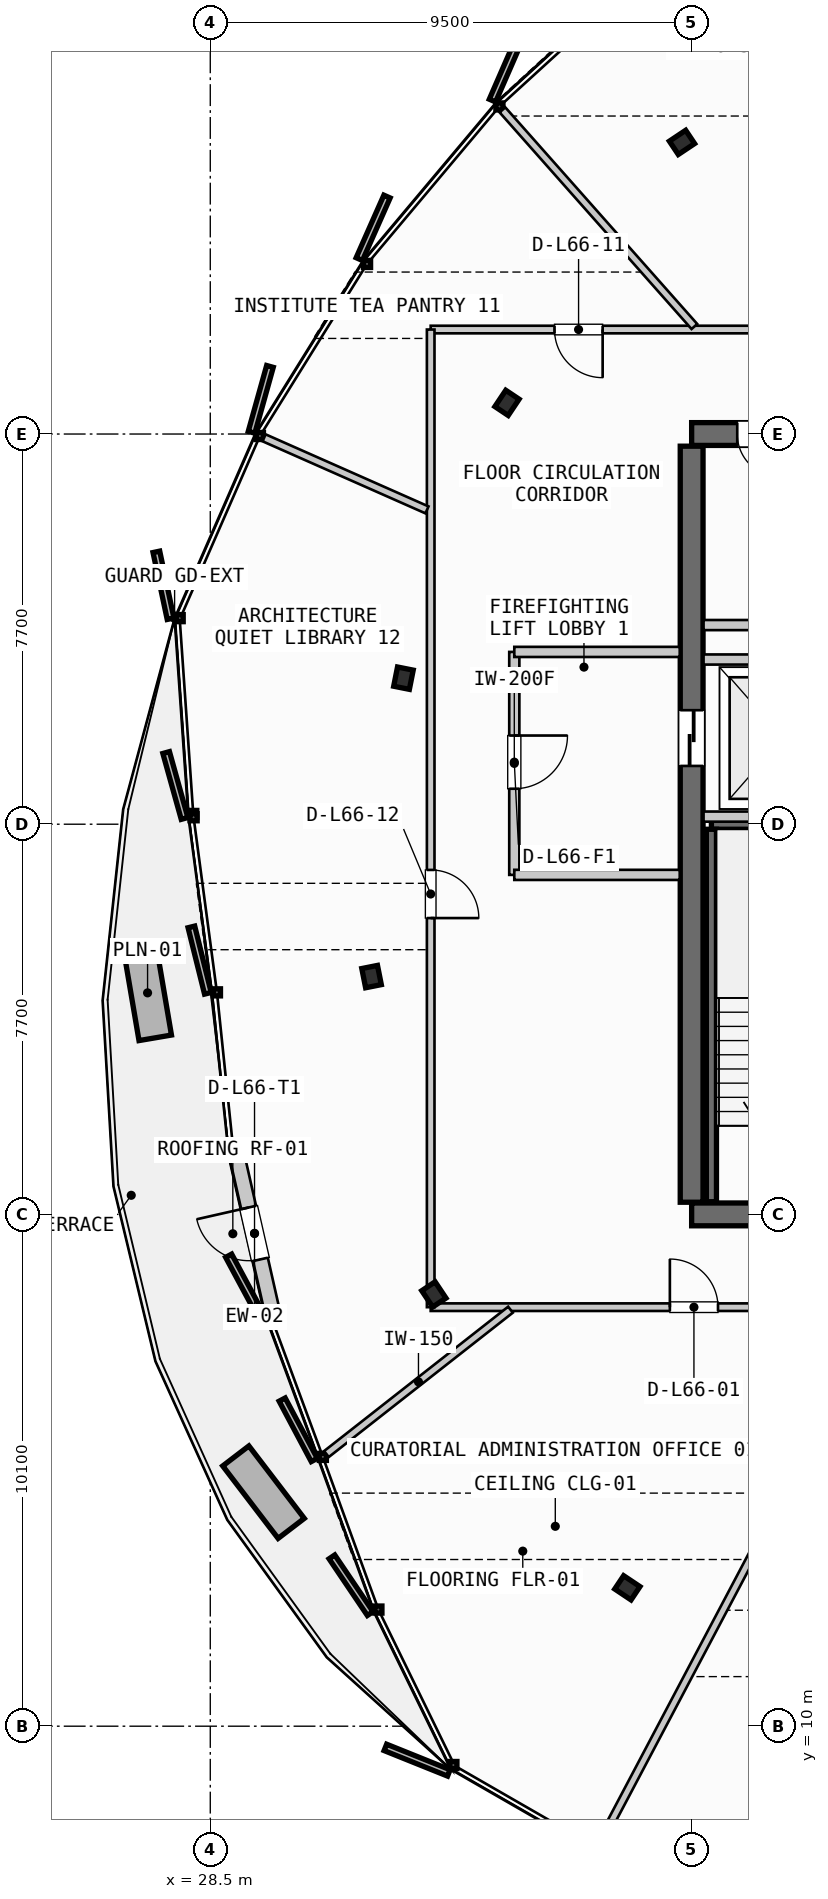
"""IFC4 building model, lengths in metres.
Left out: names, types, materials, properties, quantities, classifications, styles, units other than length and angle.
Written with IfcOpenShell. Run it as: python <this file> out.ifc"""

import sys

from ifc_helpers import new_model, si_unit, direction, frame, frame_2d, origin, origin_2d, place, context, subcontext, project, spatial, rectangle, i_section, extrude, source, transform, mapped, element, fill, save


model = new_model("IFC4")
c1 = context("Model", 3, precision=1e-05, world=origin(), true_north=direction((0.0, 1.0)))
c2 = subcontext(c1, "Body", "Model", "MODEL_VIEW")
j1 = project(units=[si_unit("LENGTHUNIT", "METRE"), si_unit("PLANEANGLEUNIT", "RADIAN")], contexts=[c1])
p1 = place(None, origin())
s1 = spatial("IfcSite", under=j1, at=p1, CompositionType="ELEMENT")
p2 = place(p1, origin())
s2 = spatial("IfcBuilding", under=s1, at=p2, CompositionType="ELEMENT")
p3 = place(p2, frame((0.0, 0.0, 252.55)))
s3 = spatial("IfcBuildingStorey", under=s2, at=p3, CompositionType="ELEMENT", Elevation=252.55)
p4 = place(p3, frame((38.0, 20.1, 0.0), z_axis=(0.0, 0.0, 1.0), x_axis=(1.0, 0.0, 0.0)))
e1 = element("IfcWall", 1, at=p4, inside=s3, PredefinedType="SHEAR", context=c2, shape_type="SweptSolid", body=[
    extrude(rectangle(XDim=17.6, YDim=0.45, at=frame_2d((8.8, 0.0))), origin(), (0.0, 0.0, 1.0), 3.21),
])
p5 = place(p4, frame((1.4, 0.0, 0.0)))
e2 = element("IfcOpeningElement", 2, at=p5, cuts=e1, PredefinedType="OPENING", context=c2, shape_type="SweptSolid", body=[
    extrude(rectangle(XDim=1.05, YDim=2.15, at=frame_2d((0.525, 1.075))), frame((0.0, 0.235, 0.0), z_axis=(0.0, -1.0, 0.0), x_axis=(1.0, 0.0, 0.0)), (0.0, 0.0, 1.0), 0.47),
])
p6 = place(p4, frame((15.15, 0.0, 0.0)))
e3 = element("IfcOpeningElement", 3, at=p6, cuts=e1, PredefinedType="OPENING", context=c2, shape_type="SweptSolid", body=[
    extrude(rectangle(XDim=1.05, YDim=2.15, at=frame_2d((0.525, 1.075))), frame((0.0, 0.235, 0.0), z_axis=(0.0, -1.0, 0.0), x_axis=(1.0, 0.0, 0.0)), (0.0, 0.0, 1.0), 0.47),
])
p7 = place(p4, frame((5.25, 0.0, 0.0)))
e4 = element("IfcOpeningElement", 4, at=p7, cuts=e1, PredefinedType="OPENING", context=c2, shape_type="SweptSolid", body=[
    extrude(rectangle(XDim=0.95, YDim=2.15, at=frame_2d((0.475, 1.075))), frame((0.0, 0.235, 0.0), z_axis=(0.0, -1.0, 0.0), x_axis=(1.0, 0.0, 0.0)), (0.0, 0.0, 1.0), 0.47),
])
p8 = place(p4, frame((11.4, 0.0, 0.0)))
e5 = element("IfcOpeningElement", 5, at=p8, cuts=e1, PredefinedType="OPENING", context=c2, shape_type="SweptSolid", body=[
    extrude(rectangle(XDim=0.95, YDim=2.15, at=frame_2d((0.475, 1.075))), frame((0.0, 0.235, 0.0), z_axis=(0.0, -1.0, 0.0), x_axis=(1.0, 0.0, 0.0)), (0.0, 0.0, 1.0), 0.47),
])
p9 = place(p3, frame((55.6, 35.5, 0.0), z_axis=(0.0, 0.0, 1.0), x_axis=(-1.0, 0.0, 0.0)))
e6 = element("IfcWall", 6, at=p9, inside=s3, PredefinedType="SHEAR", context=c2, shape_type="SweptSolid", body=[
    extrude(rectangle(XDim=17.6, YDim=0.45, at=frame_2d((8.8, 0.0))), origin(), (0.0, 0.0, 1.0), 3.21),
])
p10 = place(p9, frame((8.05, 0.0, 0.0)))
e7 = element("IfcOpeningElement", 7, at=p10, cuts=e6, PredefinedType="OPENING", context=c2, shape_type="SweptSolid", body=[
    extrude(rectangle(XDim=1.5, YDim=2.2, at=frame_2d((0.75, 1.1))), frame((0.0, 0.235, 0.0), z_axis=(0.0, -1.0, 0.0), x_axis=(1.0, 0.0, 0.0)), (0.0, 0.0, 1.0), 0.47),
])
p11 = place(p9, frame((15.85, 0.0, 0.0)))
e8 = element("IfcOpeningElement", 8, at=p11, cuts=e6, PredefinedType="OPENING", context=c2, shape_type="SweptSolid", body=[
    extrude(rectangle(XDim=0.85, YDim=2.15, at=frame_2d((0.425, 1.075))), frame((0.0, 0.235, 0.0), z_axis=(0.0, -1.0, 0.0), x_axis=(1.0, 0.0, 0.0)), (0.0, 0.0, 1.0), 0.47),
])
p12 = place(p9, frame((14.35, 0.0, 0.0)))
e9 = element("IfcOpeningElement", 9, at=p12, cuts=e6, PredefinedType="OPENING", context=c2, shape_type="SweptSolid", body=[
    extrude(rectangle(XDim=0.85, YDim=2.15, at=frame_2d((0.425, 1.075))), frame((0.0, 0.235, 0.0), z_axis=(0.0, -1.0, 0.0), x_axis=(1.0, 0.0, 0.0)), (0.0, 0.0, 1.0), 0.47),
])
p13 = place(p9, frame((12.3, 0.0, 0.0)))
e10 = element("IfcOpeningElement", 10, at=p13, cuts=e6, PredefinedType="OPENING", context=c2, shape_type="SweptSolid", body=[
    extrude(rectangle(XDim=0.95, YDim=2.15, at=frame_2d((0.475, 1.075))), frame((0.0, 0.235, 0.0), z_axis=(0.0, -1.0, 0.0), x_axis=(1.0, 0.0, 0.0)), (0.0, 0.0, 1.0), 0.47),
])
p14 = place(p9, frame((10.2, 0.0, 0.0)))
e11 = element("IfcOpeningElement", 11, at=p14, cuts=e6, PredefinedType="OPENING", context=c2, shape_type="SweptSolid", body=[
    extrude(rectangle(XDim=0.9, YDim=2.15, at=frame_2d((0.45, 1.075))), frame((0.0, 0.235, 0.0), z_axis=(0.0, -1.0, 0.0), x_axis=(1.0, 0.0, 0.0)), (0.0, 0.0, 1.0), 0.47),
])
p15 = place(p3, frame((38.0, 35.26, 0.0), z_axis=(0.0, 0.0, 1.0), x_axis=(0.0, -1.0, 0.0)))
e12 = element("IfcWall", 12, at=p15, inside=s3, PredefinedType="SHEAR", context=c2, shape_type="SweptSolid", body=[
    extrude(rectangle(XDim=14.92, YDim=0.45, at=frame_2d((7.46, 0.0))), origin(), (0.0, 0.0, 1.0), 3.21),
])
p16 = place(p15, frame((5.21, 0.0, 0.0)))
e13 = element("IfcOpeningElement", 13, at=p16, cuts=e12, PredefinedType="OPENING", context=c2, shape_type="SweptSolid", body=[
    extrude(rectangle(XDim=1.1, YDim=2.2, at=frame_2d((0.55, 1.1))), frame((0.0, 0.235, 0.0), z_axis=(0.0, -1.0, 0.0), x_axis=(1.0, 0.0, 0.0)), (0.0, 0.0, 1.0), 0.47),
])
m1 = source(origin(), c2, "Body", "SweptSolid", [
    extrude(i_section(OverallWidth=0.387, OverallDepth=0.316, WebThickness=0.019, FlangeThickness=0.028, FilletRadius=0.015, at=origin_2d()), origin(), (0.0, 0.0, 1.0), 3.21),
])
for number, where, z_axis, x_axis in (
    (14, (37.81, 41.255, 0.0), (0.0, 0.0, 1.0), (-0.556, 0.831, 0.0)),
    (15, (34.356, 36.115, 0.0), (0.0, 0.0, 1.0), (-0.831, 0.556, 0.0)),
    (16, (32.312, 30.682, 0.0), (0.0, 0.0, 1.0), (-0.981, 0.195, 0.0)),
    (17, (31.683, 24.793, 0.0), (0.0, 0.0, 1.0), (-0.981, -0.195, 0.0)),
    (18, (32.913, 18.521, 0.0), (0.0, 0.0, 1.0), (-0.831, -0.556, 0.0)),
    (19, (36.731, 12.731, 0.0), (0.0, 0.0, 1.0), (-0.556, -0.831, 0.0)),
):
    element("IfcColumn", number, at=place(p3, frame(where, z_axis=z_axis, x_axis=x_axis)), inside=s3, PredefinedType="COLUMN", context=c2, shape_type="MappedRepresentation", body=[
        mapped(m1, transform((0.0, 0.0, 0.0), scale=1.0)),
    ])
p17 = place(p3, frame((29.721, 18.192, 0.0), z_axis=(0.0, 0.0, 1.0), x_axis=(-0.221248249318, 0.97521752044, 0.0)))
e20 = element("IfcWall", 20, at=p17, inside=s3, PredefinedType="SOLIDWALL", context=c2, shape_type="SweptSolid", body=[
    extrude(rectangle(XDim=3.142, YDim=0.3, at=frame_2d((1.571, 0.0))), origin(), (0.0, 0.0, 1.0), 2.735),
])
p18 = place(p17, frame((1.046, 0.0, 0.0)))
e21 = element("IfcOpeningElement", 21, at=p18, cuts=e20, PredefinedType="OPENING", context=c2, shape_type="SweptSolid", body=[
    extrude(rectangle(XDim=1.05, YDim=2.2, at=frame_2d((0.525, 1.1))), frame((0.0, 0.16, 0.0), z_axis=(0.0, -1.0, 0.0), x_axis=(1.0, 0.0, 0.0)), (0.0, 0.0, 1.0), 0.32),
])
p19 = place(p3, frame((38.39, 27.8, 0.0), z_axis=(0.0, 0.0, 1.0), x_axis=(1.0, 0.0, 0.0)))
e22 = element("IfcWall", 22, at=p19, inside=s3, PredefinedType="SHEAR", context=c2, shape_type="SweptSolid", body=[
    extrude(rectangle(XDim=3.06, YDim=0.2, at=frame_2d((1.53, 0.0))), origin(), (0.0, 0.0, 1.0), 3.21),
])
p20 = place(p3, frame((38.39, 20.35, 0.0), z_axis=(0.0, 0.0, 1.0), x_axis=(0.0, 1.0, 0.0)))
e23 = element("IfcWall", 23, at=p20, inside=s3, PredefinedType="SHEAR", context=c2, shape_type="SweptSolid", body=[
    extrude(rectangle(XDim=7.35, YDim=0.2, at=frame_2d((3.675, 0.0))), origin(), (0.0, 0.0, 1.0), 3.21),
])
for number, where, z_axis, x_axis in (
    (24, (38.235, 27.95, 0.0), (0.0, 0.0, 1.0), (1.0, 0.0, 0.0)),
    (25, (38.235, 31.05, 0.0), (0.0, 0.0, 1.0), (1.0, 0.0, 0.0)),
):
    element("IfcWall", number, at=place(p3, frame(where, z_axis=z_axis, x_axis=x_axis)), inside=s3, PredefinedType="PARTITIONING", context=c2, shape_type="SweptSolid", body=[
        extrude(rectangle(XDim=2.915, YDim=0.2, at=frame_2d((1.458, 0.0))), origin(), (0.0, 0.0, 1.0), 2.28),
    ])
p21 = place(p3, frame((34.5, 31.2, 0.0), z_axis=(0.0, 0.0, 1.0), x_axis=(0.0, -1.0, 0.0)))
e26 = element("IfcWall", 26, at=p21, inside=s3, PredefinedType="PARTITIONING", context=c2, shape_type="SweptSolid", body=[
    extrude(rectangle(XDim=4.4, YDim=0.2, at=frame_2d((2.2, 0.0))), origin(), (0.0, 0.0, 1.0), 2.28),
])
p22 = place(p21, frame((1.65, 0.0, 0.0)))
e27 = element("IfcOpeningElement", 27, at=p22, cuts=e26, PredefinedType="OPENING", context=c2, shape_type="SweptSolid", body=[
    extrude(rectangle(XDim=1.05, YDim=2.15, at=frame_2d((0.525, 1.075))), frame((0.0, 0.11, 0.0), z_axis=(0.0, -1.0, 0.0), x_axis=(1.0, 0.0, 0.0)), (0.0, 0.0, 1.0), 0.22),
])
for number, where, z_axis, x_axis in (
    (28, (34.5, 26.8, 0.0), (0.0, 0.0, 1.0), (1.0, 0.0, 0.0)),
    (29, (34.5, 31.2, 0.0), (0.0, 0.0, 1.0), (1.0, 0.0, 0.0)),
):
    element("IfcWall", number, at=place(p3, frame(where, z_axis=z_axis, x_axis=x_axis)), inside=s3, PredefinedType="PARTITIONING", context=c2, shape_type="SweptSolid", body=[
        extrude(rectangle(XDim=3.265, YDim=0.2, at=frame_2d((1.632, 0.0))), origin(), (0.0, 0.0, 1.0), 2.28),
    ])
p23 = place(p3, frame((38.235, 31.73, 0.0), z_axis=(0.0, 0.0, 1.0), x_axis=(1.0, 0.0, 0.0)))
e30 = element("IfcWall", 30, at=p23, inside=s3, PredefinedType="PARTITIONING", context=c2, shape_type="SweptSolid", body=[
    extrude(rectangle(XDim=7.565, YDim=0.2, at=frame_2d((3.782, 0.0))), origin(), (0.0, 0.0, 1.0), 2.28),
])
p24 = place(p3, frame((32.85, 18.269, 0.0), z_axis=(0.0, 0.0, 1.0), x_axis=(1.0, 0.0, 0.0)))
e31 = element("IfcWall", 31, at=p24, inside=s3, PredefinedType="PARTITIONING", context=c2, shape_type="SweptSolid", body=[
    extrude(rectangle(XDim=28.038, YDim=0.15, at=frame_2d((14.019, 0.0))), origin(), (0.0, 0.0, 1.0), 2.28),
])
p25 = place(p24, frame((4.72, 0.0, 0.0)))
e32 = element("IfcOpeningElement", 32, at=p25, cuts=e31, PredefinedType="OPENING", context=c2, shape_type="SweptSolid", body=[
    extrude(rectangle(XDim=0.95, YDim=2.15, at=frame_2d((0.475, 1.075))), frame((0.0, 0.085, 0.0), z_axis=(0.0, -1.0, 0.0), x_axis=(1.0, 0.0, 0.0)), (0.0, 0.0, 1.0), 0.17),
])
p26 = place(p24, frame((10.824, 0.0, 0.0)))
e33 = element("IfcOpeningElement", 33, at=p26, cuts=e31, PredefinedType="OPENING", context=c2, shape_type="SweptSolid", body=[
    extrude(rectangle(XDim=0.95, YDim=2.15, at=frame_2d((0.475, 1.075))), frame((0.0, 0.085, 0.0), z_axis=(0.0, -1.0, 0.0), x_axis=(1.0, 0.0, 0.0)), (0.0, 0.0, 1.0), 0.17),
])
p27 = place(p24, frame((16.132, 0.0, 0.0)))
e34 = element("IfcOpeningElement", 34, at=p27, cuts=e31, PredefinedType="OPENING", context=c2, shape_type="SweptSolid", body=[
    extrude(rectangle(XDim=0.95, YDim=2.15, at=frame_2d((0.475, 1.075))), frame((0.0, 0.085, 0.0), z_axis=(0.0, -1.0, 0.0), x_axis=(1.0, 0.0, 0.0)), (0.0, 0.0, 1.0), 0.17),
])
p28 = place(p24, frame((22.987, 0.0, 0.0)))
e35 = element("IfcOpeningElement", 35, at=p28, cuts=e31, PredefinedType="OPENING", context=c2, shape_type="SweptSolid", body=[
    extrude(rectangle(XDim=0.95, YDim=2.15, at=frame_2d((0.475, 1.075))), frame((0.0, 0.085, 0.0), z_axis=(0.0, -1.0, 0.0), x_axis=(1.0, 0.0, 0.0)), (0.0, 0.0, 1.0), 0.17),
])
p29 = place(p3, frame((60.888, 37.562, 0.0), z_axis=(0.0, 0.0, 1.0), x_axis=(-1.0, 0.0, 0.0)))
e36 = element("IfcWall", 36, at=p29, inside=s3, PredefinedType="PARTITIONING", context=c2, shape_type="SweptSolid", body=[
    extrude(rectangle(XDim=28.038, YDim=0.15, at=frame_2d((14.019, 0.0))), origin(), (0.0, 0.0, 1.0), 2.28),
])
p30 = place(p29, frame((5.737, 0.0, 0.0)))
e37 = element("IfcOpeningElement", 37, at=p30, cuts=e36, PredefinedType="OPENING", context=c2, shape_type="SweptSolid", body=[
    extrude(rectangle(XDim=0.95, YDim=2.15, at=frame_2d((0.475, 1.075))), frame((0.0, 0.085, 0.0), z_axis=(0.0, -1.0, 0.0), x_axis=(1.0, 0.0, 0.0)), (0.0, 0.0, 1.0), 0.17),
])
p31 = place(p29, frame((12.102, 0.0, 0.0)))
e38 = element("IfcOpeningElement", 38, at=p31, cuts=e36, PredefinedType="OPENING", context=c2, shape_type="SweptSolid", body=[
    extrude(rectangle(XDim=0.95, YDim=2.15, at=frame_2d((0.475, 1.075))), frame((0.0, 0.085, 0.0), z_axis=(0.0, -1.0, 0.0), x_axis=(1.0, 0.0, 0.0)), (0.0, 0.0, 1.0), 0.17),
])
p32 = place(p29, frame((18.47, 0.0, 0.0)))
e39 = element("IfcOpeningElement", 39, at=p32, cuts=e36, PredefinedType="OPENING", context=c2, shape_type="SweptSolid", body=[
    extrude(rectangle(XDim=0.95, YDim=2.15, at=frame_2d((0.475, 1.075))), frame((0.0, 0.085, 0.0), z_axis=(0.0, -1.0, 0.0), x_axis=(1.0, 0.0, 0.0)), (0.0, 0.0, 1.0), 0.17),
])
p33 = place(p29, frame((24.644, 0.0, 0.0)))
e40 = element("IfcOpeningElement", 40, at=p33, cuts=e36, PredefinedType="OPENING", context=c2, shape_type="SweptSolid", body=[
    extrude(rectangle(XDim=0.95, YDim=2.15, at=frame_2d((0.475, 1.075))), frame((0.0, 0.085, 0.0), z_axis=(0.0, -1.0, 0.0), x_axis=(1.0, 0.0, 0.0)), (0.0, 0.0, 1.0), 0.17),
])
p34 = place(p3, frame((32.85, 37.562, 0.0), z_axis=(0.0, 0.0, 1.0), x_axis=(0.0, -1.0, 0.0)))
e41 = element("IfcWall", 41, at=p34, inside=s3, PredefinedType="PARTITIONING", context=c2, shape_type="SweptSolid", body=[
    extrude(rectangle(XDim=19.293, YDim=0.15, at=frame_2d((9.646, 0.0))), origin(), (0.0, 0.0, 1.0), 2.28),
])
p35 = place(p34, frame((10.664, 0.0, 0.0)))
e42 = element("IfcOpeningElement", 42, at=p35, cuts=e41, PredefinedType="OPENING", context=c2, shape_type="SweptSolid", body=[
    extrude(rectangle(XDim=0.95, YDim=2.15, at=frame_2d((0.475, 1.075))), frame((0.0, 0.085, 0.0), z_axis=(0.0, -1.0, 0.0), x_axis=(1.0, 0.0, 0.0)), (0.0, 0.0, 1.0), 0.17),
])
p36 = place(p3, frame((34.425, 18.219, 0.0), z_axis=(0.0, 0.0, 1.0), x_axis=(-0.786874062285, -0.61711361199, 0.0)))
e43 = element("IfcWall", 43, at=p36, inside=s3, PredefinedType="PARTITIONING", context=c2, shape_type="SweptSolid", body=[
    extrude(rectangle(XDim=4.616, YDim=0.15, at=frame_2d((2.308, 0.0))), origin(), (0.0, 0.0, 1.0), 2.28),
])
p37 = place(p3, frame((41.743, 18.198, 0.0), z_axis=(0.0, 0.0, 1.0), x_axis=(-0.467260826369, -0.884119516887, 0.0)))
e44 = element("IfcWall", 44, at=p37, inside=s3, PredefinedType="PARTITIONING", context=c2, shape_type="SweptSolid", body=[
    extrude(rectangle(XDim=11.901, YDim=0.15, at=frame_2d((5.951, 0.0))), origin(), (0.0, 0.0, 1.0), 2.28),
])
p38 = place(p3, frame((38.054, 37.622, 0.0), z_axis=(0.0, 0.0, 1.0), x_axis=(-0.663185102797, 0.748455422472, 0.0)))
e45 = element("IfcWall", 45, at=p38, inside=s3, PredefinedType="PARTITIONING", context=c2, shape_type="SweptSolid", body=[
    extrude(rectangle(XDim=5.712, YDim=0.15, at=frame_2d((2.856, 0.0))), origin(), (0.0, 0.0, 1.0), 2.28),
])
p39 = place(p3, frame((32.777, 34.003, 0.0), z_axis=(0.0, 0.0, 1.0), x_axis=(-0.914477528369, 0.404636689028, 0.0)))
e46 = element("IfcWall", 46, at=p39, inside=s3, PredefinedType="PARTITIONING", context=c2, shape_type="SweptSolid", body=[
    extrude(rectangle(XDim=3.516, YDim=0.15, at=frame_2d((1.758, 0.0))), origin(), (0.0, 0.0, 1.0), 2.28),
])
m2 = source(origin(), c2, "Body", "SweptSolid", [
    extrude(rectangle(XDim=1.05, YDim=2.2, at=frame_2d((0.525, 1.1))), frame((0.0, 0.025, 0.0), z_axis=(0.0, -1.0, 0.0), x_axis=(1.0, 0.0, 0.0)), (0.0, 0.0, 1.0), 0.05),
])
p40 = place(p18, origin())
e47 = element("IfcDoor", 47, at=p40, inside=s3, OperationType="SINGLE_SWING_RIGHT", PredefinedType="DOOR", context=c2, shape_type="MappedRepresentation", body=[
    mapped(m2, transform((0.0, 0.0, 0.0), scale=1.0)),
])
fill(e21, e47)
m3 = source(origin(), c2, "Body", "SweptSolid", [
    extrude(rectangle(XDim=1.1, YDim=2.2, at=frame_2d((0.55, 1.1))), frame((0.0, 0.025, 0.0), z_axis=(0.0, -1.0, 0.0), x_axis=(1.0, 0.0, 0.0)), (0.0, 0.0, 1.0), 0.05),
])
p41 = place(p16, origin())
e48 = element("IfcDoor", 48, at=p41, inside=s3, OperationType="SLIDING_TO_LEFT", PredefinedType="DOOR", context=c2, shape_type="MappedRepresentation", body=[
    mapped(m3, transform((0.0, 0.0, 0.0), scale=1.0)),
])
fill(e13, e48)
m4 = source(origin(), c2, "Body", "SweptSolid", [
    extrude(rectangle(XDim=0.85, YDim=2.15, at=frame_2d((0.425, 1.075))), frame((0.0, 0.025, 0.0), z_axis=(0.0, -1.0, 0.0), x_axis=(1.0, 0.0, 0.0)), (0.0, 0.0, 1.0), 0.05),
])
p42 = place(p11, origin())
e49 = element("IfcDoor", 49, at=p42, inside=s3, OperationType="SINGLE_SWING_LEFT", PredefinedType="DOOR", context=c2, shape_type="MappedRepresentation", body=[
    mapped(m4, transform((0.0, 0.0, 0.0), scale=1.0)),
])
fill(e8, e49)
m5 = source(origin(), c2, "Body", "SweptSolid", [
    extrude(rectangle(XDim=1.05, YDim=2.15, at=frame_2d((0.525, 1.075))), frame((0.0, 0.025, 0.0), z_axis=(0.0, -1.0, 0.0), x_axis=(1.0, 0.0, 0.0)), (0.0, 0.0, 1.0), 0.05),
])
p43 = place(p22, origin())
e50 = element("IfcDoor", 50, at=p43, inside=s3, OperationType="SINGLE_SWING_LEFT", PredefinedType="DOOR", context=c2, shape_type="MappedRepresentation", body=[
    mapped(m5, transform((0.0, 0.0, 0.0), scale=1.0)),
])
fill(e27, e50)
m6 = source(origin(), c2, "Body", "SweptSolid", [
    extrude(rectangle(XDim=0.95, YDim=2.15, at=frame_2d((0.475, 1.075))), frame((0.0, 0.025, 0.0), z_axis=(0.0, -1.0, 0.0), x_axis=(1.0, 0.0, 0.0)), (0.0, 0.0, 1.0), 0.05),
])
p44 = place(p25, origin())
e51 = element("IfcDoor", 51, at=p44, inside=s3, OperationType="SINGLE_SWING_LEFT", PredefinedType="DOOR", context=c2, shape_type="MappedRepresentation", body=[
    mapped(m6, transform((0.0, 0.0, 0.0), scale=1.0)),
])
fill(e32, e51)
p45 = place(p33, origin())
e52 = element("IfcDoor", 52, at=p45, inside=s3, OperationType="SINGLE_SWING_LEFT", PredefinedType="DOOR", context=c2, shape_type="MappedRepresentation", body=[
    mapped(m6, transform((0.0, 0.0, 0.0), scale=1.0)),
])
fill(e40, e52)
p46 = place(p35, origin())
e53 = element("IfcDoor", 53, at=p46, inside=s3, OperationType="SINGLE_SWING_RIGHT", PredefinedType="DOOR", context=c2, shape_type="MappedRepresentation", body=[
    mapped(m6, transform((0.0, 0.0, 0.0), scale=1.0)),
])
fill(e42, e53)
save(model, sys.argv[1])
